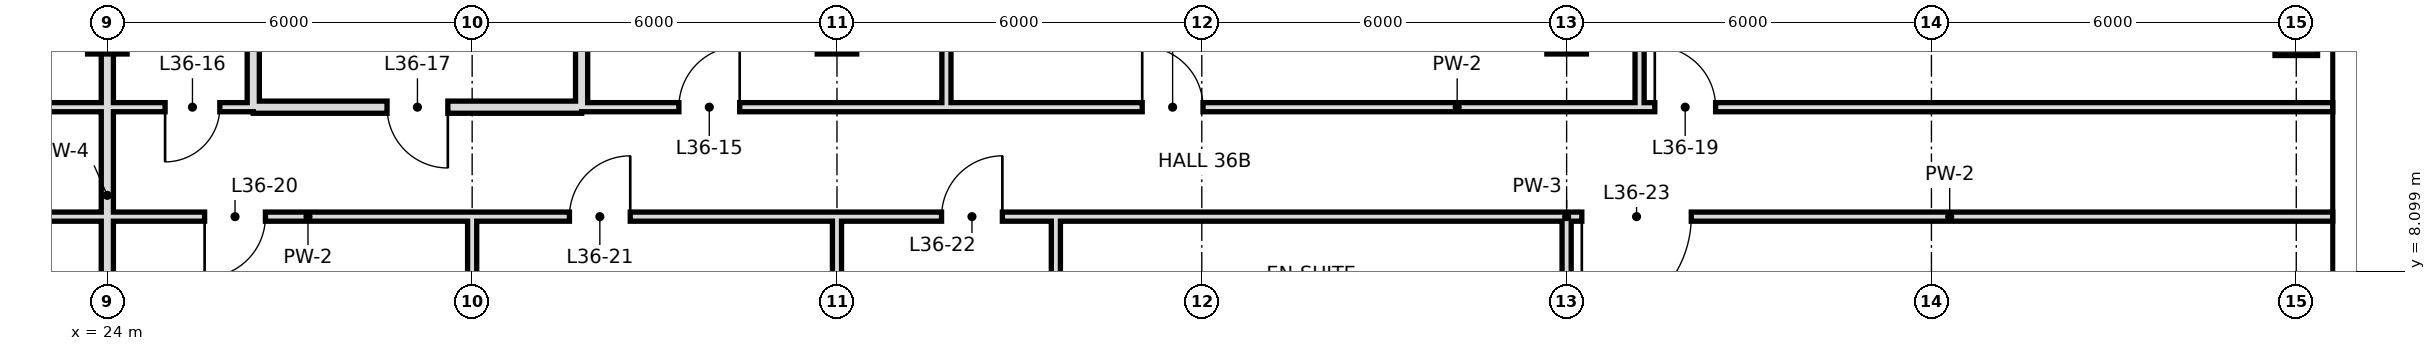
"""IFC4 building model, lengths in metres.
Left out: names, types, materials, properties, quantities, classifications, styles, units other than length and angle.
Written with IfcOpenShell. Run it as: python <this file> out.ifc"""

import sys

from ifc_helpers import new_model, si_unit, direction, frame, frame_2d, origin, origin_2d, place, context, subcontext, project, spatial, rectangle, hollow_rectangle, extrude, element, fill, save


model = new_model("IFC4")
c1 = context("Model", 3, precision=1e-05, world=origin(), true_north=direction((0.0, 1.0)))
c2 = subcontext(c1, "Body", "Model", "MODEL_VIEW")
j1 = project(units=[si_unit("LENGTHUNIT", "METRE"), si_unit("PLANEANGLEUNIT", "RADIAN")], contexts=[c1])
p1 = place(None, origin())
s1 = spatial("IfcSite", under=j1, at=p1, CompositionType="ELEMENT")
p2 = place(p1, origin())
s2 = spatial("IfcBuilding", under=s1, at=p2, CompositionType="ELEMENT")
p3 = place(p2, frame((0.0, 0.0, 158.2)))
s3 = spatial("IfcBuildingStorey", under=s2, at=p3, CompositionType="ELEMENT", Elevation=158.2)
for number, where, z_axis, x_axis in (
    (1, (24.0, 12.0, 0.0), (0.0, 0.0, 1.0), (1.0, 0.0, 0.0)),
    (2, (36.0, 12.0, 0.0), (0.0, 0.0, 1.0), (1.0, 0.0, 0.0)),
    (3, (48.0, 12.0, 0.0), (0.0, 0.0, 1.0), (1.0, 0.0, 0.0)),
):
    element("IfcColumn", number, at=place(p3, frame(where, z_axis=z_axis, x_axis=x_axis)), inside=s3, PredefinedType="COLUMN", context=c2, shape_type="SweptSolid", body=[
        extrude(hollow_rectangle(XDim=0.65, YDim=0.65, WallThickness=0.032, at=origin_2d()), origin(), (0.0, 0.0, 1.0), 3.6),
    ])
p4 = place(p3, frame((60.0, 12.0, 0.0), z_axis=(0.0, 0.0, 1.0), x_axis=(1.0, 0.0, 0.0)))
e4 = element("IfcColumn", 4, at=p4, inside=s3, PredefinedType="COLUMN", context=c2, shape_type="SweptSolid", body=[
    extrude(hollow_rectangle(XDim=0.7, YDim=0.7, WallThickness=0.036, at=origin_2d()), origin(), (0.0, 0.0, 1.0), 3.6),
])
p5 = place(p3, frame((24.0, 0.0, 0.0), z_axis=(0.0, 0.0, 1.0), x_axis=(0.0, 1.0, 0.0)))
e5 = element("IfcWall", 5, at=p5, inside=s3, PredefinedType="SOLIDWALL", context=c2, shape_type="SweptSolid", body=[
    extrude(rectangle(XDim=18.7, YDim=0.2, at=frame_2d((9.35, 0.0))), origin(), (0.0, 0.0, 1.0), 2.68),
])
p6 = place(p3, frame((26.4, 10.8, 0.0), z_axis=(0.0, 0.0, 1.0), x_axis=(0.0, 1.0, 0.0)))
e6 = element("IfcWall", 6, at=p6, inside=s3, PredefinedType="SOLIDWALL", context=c2, shape_type="SweptSolid", body=[
    extrude(rectangle(XDim=7.9, YDim=0.2, at=frame_2d((3.95, 0.0))), origin(), (0.0, 0.0, 1.0), 2.68),
])
p7 = place(p3, frame((30.0, -0.6, 0.0), z_axis=(0.0, 0.0, 1.0), x_axis=(0.0, 1.0, 0.0)))
e7 = element("IfcWall", 7, at=p7, inside=s3, PredefinedType="PARTITIONING", context=c2, shape_type="SweptSolid", body=[
    extrude(rectangle(XDim=9.6, YDim=0.15, at=frame_2d((4.8, 0.0))), origin(), (0.0, 0.0, 1.0), 2.68),
])
p8 = place(p3, frame((31.8, 10.8, 0.0), z_axis=(0.0, 0.0, 1.0), x_axis=(0.0, 1.0, 0.0)))
e8 = element("IfcWall", 8, at=p8, inside=s3, PredefinedType="SOLIDWALL", context=c2, shape_type="SweptSolid", body=[
    extrude(rectangle(XDim=7.9, YDim=0.2, at=frame_2d((3.95, 0.0))), origin(), (0.0, 0.0, 1.0), 3.38),
])
p9 = place(p3, frame((36.0, 0.0, 0.0), z_axis=(0.0, 0.0, 1.0), x_axis=(0.0, 1.0, 0.0)))
e9 = element("IfcWall", 9, at=p9, inside=s3, PredefinedType="PARTITIONING", context=c2, shape_type="SweptSolid", body=[
    extrude(rectangle(XDim=9.0, YDim=0.15, at=frame_2d((4.5, 0.0))), origin(), (0.0, 0.0, 1.0), 2.68),
])
p10 = place(p3, frame((37.8, 10.8, 0.0), z_axis=(0.0, 0.0, 1.0), x_axis=(0.0, 1.0, 0.0)))
e10 = element("IfcWall", 10, at=p10, inside=s3, PredefinedType="PARTITIONING", context=c2, shape_type="SweptSolid", body=[
    extrude(rectangle(XDim=7.9, YDim=0.15, at=frame_2d((3.95, 0.0))), origin(), (0.0, 0.0, 1.0), 3.38),
])
p11 = place(p3, frame((39.6, 6.0, 0.0), z_axis=(0.0, 0.0, 1.0), x_axis=(0.0, 1.0, 0.0)))
e11 = element("IfcWall", 11, at=p11, inside=s3, PredefinedType="PARTITIONING", context=c2, shape_type="SweptSolid", body=[
    extrude(rectangle(XDim=3.0, YDim=0.15, at=frame_2d((1.5, 0.0))), origin(), (0.0, 0.0, 1.0), 3.38),
])
p12 = place(p3, frame((48.0, 6.0, 0.0), z_axis=(0.0, 0.0, 1.0), x_axis=(0.0, 1.0, 0.0)))
e12 = element("IfcWall", 12, at=p12, inside=s3, PredefinedType="PARTITIONING", context=c2, shape_type="SweptSolid", body=[
    extrude(rectangle(XDim=3.0, YDim=0.15, at=frame_2d((1.5, 0.0))), origin(), (0.0, 0.0, 1.0), 2.68),
])
p13 = place(p3, frame((49.2, 10.8, 0.0), z_axis=(0.0, 0.0, 1.0), x_axis=(0.0, 1.0, 0.0)))
e13 = element("IfcWall", 13, at=p13, inside=s3, PredefinedType="PARTITIONING", context=c2, shape_type="SweptSolid", body=[
    extrude(rectangle(XDim=16.2, YDim=0.15, at=frame_2d((8.1, 0.0))), origin(), (0.0, 0.0, 1.0), 3.38),
])
p14 = place(p13, frame((11.2, 0.0, 0.0)))
e14 = element("IfcOpeningElement", 14, at=p14, cuts=e13, PredefinedType="OPENING", context=c2, shape_type="SweptSolid", body=[
    extrude(rectangle(XDim=1.0, YDim=2.4, at=frame_2d((0.5, 1.2))), frame((0.0, 0.085, 0.0), z_axis=(0.0, -1.0, 0.0), x_axis=(1.0, 0.0, 0.0)), (0.0, 0.0, 1.0), 0.17),
])
p15 = place(p3, frame((26.4, 10.8, 0.0), z_axis=(0.0, 0.0, 1.0), x_axis=(1.0, 0.0, 0.0)))
e15 = element("IfcWall", 15, at=p15, inside=s3, PredefinedType="SOLIDWALL", context=c2, shape_type="SweptSolid", body=[
    extrude(rectangle(XDim=5.4, YDim=0.2, at=frame_2d((2.7, 0.0))), origin(), (0.0, 0.0, 1.0), 2.68),
])
p16 = place(p15, frame((2.2, 0.0, 0.0)))
e16 = element("IfcOpeningElement", 16, at=p16, cuts=e15, PredefinedType="OPENING", context=c2, shape_type="SweptSolid", body=[
    extrude(rectangle(XDim=1.0, YDim=2.4, at=frame_2d((0.5, 1.2))), frame((0.0, 0.11, 0.0), z_axis=(0.0, -1.0, 0.0), x_axis=(1.0, 0.0, 0.0)), (0.0, 0.0, 1.0), 0.22),
])
p17 = place(p3, frame((19.2, 10.8, 0.0), z_axis=(0.0, 0.0, 1.0), x_axis=(1.0, 0.0, 0.0)))
e17 = element("IfcWall", 17, at=p17, inside=s3, PredefinedType="PARTITIONING", context=c2, shape_type="SweptSolid", body=[
    extrude(rectangle(XDim=4.8, YDim=0.15, at=frame_2d((2.4, 0.0))), origin(), (0.0, 0.0, 1.0), 3.38),
])
p18 = place(p17, frame((1.9, 0.0, 0.0)))
e18 = element("IfcOpeningElement", 18, at=p18, cuts=e17, PredefinedType="OPENING", context=c2, shape_type="SweptSolid", body=[
    extrude(rectangle(XDim=1.0, YDim=2.4, at=frame_2d((0.5, 1.2))), frame((0.0, 0.085, 0.0), z_axis=(0.0, -1.0, 0.0), x_axis=(1.0, 0.0, 0.0)), (0.0, 0.0, 1.0), 0.17),
])
p19 = place(p3, frame((31.8, 10.8, 0.0), z_axis=(0.0, 0.0, 1.0), x_axis=(1.0, 0.0, 0.0)))
e19 = element("IfcWall", 19, at=p19, inside=s3, PredefinedType="PARTITIONING", context=c2, shape_type="SweptSolid", body=[
    extrude(rectangle(XDim=28.8, YDim=0.15, at=frame_2d((14.4, 0.0))), origin(), (0.0, 0.0, 1.0), 3.38),
])
p20 = place(p19, frame((1.6, 0.0, 0.0)))
e20 = element("IfcOpeningElement", 20, at=p20, cuts=e19, PredefinedType="OPENING", context=c2, shape_type="SweptSolid", body=[
    extrude(rectangle(XDim=1.0, YDim=2.4, at=frame_2d((0.5, 1.2))), frame((0.0, 0.085, 0.0), z_axis=(0.0, -1.0, 0.0), x_axis=(1.0, 0.0, 0.0)), (0.0, 0.0, 1.0), 0.17),
])
p21 = place(p19, frame((9.22, 0.0, 0.0)))
e21 = element("IfcOpeningElement", 21, at=p21, cuts=e19, PredefinedType="OPENING", context=c2, shape_type="SweptSolid", body=[
    extrude(rectangle(XDim=1.0, YDim=2.4, at=frame_2d((0.5, 1.2))), frame((0.0, 0.085, 0.0), z_axis=(0.0, -1.0, 0.0), x_axis=(1.0, 0.0, 0.0)), (0.0, 0.0, 1.0), 0.17),
])
p22 = place(p19, frame((17.65, 0.0, 0.0)))
e22 = element("IfcOpeningElement", 22, at=p22, cuts=e19, PredefinedType="OPENING", context=c2, shape_type="SweptSolid", body=[
    extrude(rectangle(XDim=1.0, YDim=2.4, at=frame_2d((0.5, 1.2))), frame((0.0, 0.085, 0.0), z_axis=(0.0, -1.0, 0.0), x_axis=(1.0, 0.0, 0.0)), (0.0, 0.0, 1.0), 0.17),
])
p23 = place(p3, frame((24.0, 10.8, 0.0), z_axis=(0.0, 0.0, 1.0), x_axis=(1.0, 0.0, 0.0)))
e23 = element("IfcWall", 23, at=p23, inside=s3, PredefinedType="PARTITIONING", context=c2, shape_type="SweptSolid", body=[
    extrude(rectangle(XDim=2.4, YDim=0.15, at=frame_2d((1.2, 0.0))), origin(), (0.0, 0.0, 1.0), 3.38),
])
p24 = place(p23, frame((0.95, 0.0, 0.0)))
e24 = element("IfcOpeningElement", 24, at=p24, cuts=e23, PredefinedType="OPENING", context=c2, shape_type="SweptSolid", body=[
    extrude(rectangle(XDim=0.9, YDim=2.4, at=frame_2d((0.45, 1.2))), frame((0.0, 0.085, 0.0), z_axis=(0.0, -1.0, 0.0), x_axis=(1.0, 0.0, 0.0)), (0.0, 0.0, 1.0), 0.17),
])
p25 = place(p3, frame((15.0, 9.0, 0.0), z_axis=(0.0, 0.0, 1.0), x_axis=(1.0, 0.0, 0.0)))
e25 = element("IfcWall", 25, at=p25, inside=s3, PredefinedType="PARTITIONING", context=c2, shape_type="SweptSolid", body=[
    extrude(rectangle(XDim=24.6, YDim=0.15, at=frame_2d((12.3, 0.0))), origin(), (0.0, 0.0, 1.0), 3.38),
])
p26 = place(p25, frame((1.3, 0.0, 0.0)))
e26 = element("IfcOpeningElement", 26, at=p26, cuts=e25, PredefinedType="OPENING", context=c2, shape_type="SweptSolid", body=[
    extrude(rectangle(XDim=1.0, YDim=2.4, at=frame_2d((0.5, 1.2))), frame((0.0, 0.085, 0.0), z_axis=(0.0, -1.0, 0.0), x_axis=(1.0, 0.0, 0.0)), (0.0, 0.0, 1.0), 0.17),
])
p27 = place(p25, frame((5.84, 0.0, 0.0)))
e27 = element("IfcOpeningElement", 27, at=p27, cuts=e25, PredefinedType="OPENING", context=c2, shape_type="SweptSolid", body=[
    extrude(rectangle(XDim=1.8, YDim=2.4, at=frame_2d((0.9, 1.2))), frame((0.0, 0.085, 0.0), z_axis=(0.0, -1.0, 0.0), x_axis=(1.0, 0.0, 0.0)), (0.0, 0.0, 1.0), 0.17),
])
p28 = place(p25, frame((10.6, 0.0, 0.0)))
e28 = element("IfcOpeningElement", 28, at=p28, cuts=e25, PredefinedType="OPENING", context=c2, shape_type="SweptSolid", body=[
    extrude(rectangle(XDim=1.0, YDim=2.4, at=frame_2d((0.5, 1.2))), frame((0.0, 0.085, 0.0), z_axis=(0.0, -1.0, 0.0), x_axis=(1.0, 0.0, 0.0)), (0.0, 0.0, 1.0), 0.17),
])
p29 = place(p25, frame((16.6, 0.0, 0.0)))
e29 = element("IfcOpeningElement", 29, at=p29, cuts=e25, PredefinedType="OPENING", context=c2, shape_type="SweptSolid", body=[
    extrude(rectangle(XDim=1.0, YDim=2.4, at=frame_2d((0.5, 1.2))), frame((0.0, 0.085, 0.0), z_axis=(0.0, -1.0, 0.0), x_axis=(1.0, 0.0, 0.0)), (0.0, 0.0, 1.0), 0.17),
])
p30 = place(p25, frame((22.72, 0.0, 0.0)))
e30 = element("IfcOpeningElement", 30, at=p30, cuts=e25, PredefinedType="OPENING", context=c2, shape_type="SweptSolid", body=[
    extrude(rectangle(XDim=1.0, YDim=2.4, at=frame_2d((0.5, 1.2))), frame((0.0, 0.085, 0.0), z_axis=(0.0, -1.0, 0.0), x_axis=(1.0, 0.0, 0.0)), (0.0, 0.0, 1.0), 0.17),
])
p31 = place(p3, frame((48.0, 9.0, 0.0), z_axis=(0.0, 0.0, 1.0), x_axis=(1.0, 0.0, 0.0)))
e31 = element("IfcWall", 31, at=p31, inside=s3, PredefinedType="PARTITIONING", context=c2, shape_type="SweptSolid", body=[
    extrude(rectangle(XDim=12.6, YDim=0.15, at=frame_2d((6.3, 0.0))), origin(), (0.0, 0.0, 1.0), 3.38),
])
p32 = place(p31, frame((0.25, 0.0, 0.0)))
e32 = element("IfcOpeningElement", 32, at=p32, cuts=e31, PredefinedType="OPENING", context=c2, shape_type="SweptSolid", body=[
    extrude(rectangle(XDim=1.8, YDim=2.4, at=frame_2d((0.9, 1.2))), frame((0.0, 0.085, 0.0), z_axis=(0.0, -1.0, 0.0), x_axis=(1.0, 0.0, 0.0)), (0.0, 0.0, 1.0), 0.17),
])
p33 = place(p3, frame((39.6, 9.0, 0.0), z_axis=(0.0, 0.0, 1.0), x_axis=(1.0, 0.0, 0.0)))
e33 = element("IfcWall", 33, at=p33, inside=s3, PredefinedType="PARTITIONING", context=c2, shape_type="SweptSolid", body=[
    extrude(rectangle(XDim=8.4, YDim=0.15, at=frame_2d((4.2, 0.0))), origin(), (0.0, 0.0, 1.0), 3.38),
])
p34 = place(p20, frame((1.0, 0.0, 0.0), z_axis=(0.0, 0.0, 1.0), x_axis=(-1.0, 0.0, 0.0)))
e34 = element("IfcDoor", 34, at=p34, inside=s3, OperationType="SINGLE_SWING_LEFT", PredefinedType="DOOR", context=c2, shape_type="SweptSolid", body=[
    extrude(rectangle(XDim=1.0, YDim=2.4, at=frame_2d((0.5, 1.2))), frame((0.0, 0.025, 0.0), z_axis=(0.0, -1.0, 0.0), x_axis=(1.0, 0.0, 0.0)), (0.0, 0.0, 1.0), 0.05),
])
fill(e20, e34)
p35 = place(p24, frame((0.9, 0.0, 0.0), z_axis=(0.0, 0.0, 1.0), x_axis=(-1.0, 0.0, 0.0)))
e35 = element("IfcDoor", 35, at=p35, inside=s3, OperationType="SINGLE_SWING_RIGHT", PredefinedType="DOOR", context=c2, shape_type="SweptSolid", body=[
    extrude(rectangle(XDim=0.9, YDim=2.4, at=frame_2d((0.45, 1.2))), frame((0.0, 0.025, 0.0), z_axis=(0.0, -1.0, 0.0), x_axis=(1.0, 0.0, 0.0)), (0.0, 0.0, 1.0), 0.05),
])
fill(e24, e35)
p36 = place(p16, origin())
e36 = element("IfcDoor", 36, at=p36, inside=s3, OperationType="SINGLE_SWING_RIGHT", PredefinedType="DOOR", context=c2, shape_type="SweptSolid", body=[
    extrude(rectangle(XDim=1.0, YDim=2.4, at=frame_2d((0.5, 1.2))), frame((0.0, 0.025, 0.0), z_axis=(0.0, -1.0, 0.0), x_axis=(1.0, 0.0, 0.0)), (0.0, 0.0, 1.0), 0.05),
])
fill(e16, e36)
p37 = place(p21, origin())
e37 = element("IfcDoor", 37, at=p37, inside=s3, OperationType="SINGLE_SWING_LEFT", PredefinedType="DOOR", context=c2, shape_type="SweptSolid", body=[
    extrude(rectangle(XDim=1.0, YDim=2.4, at=frame_2d((0.5, 1.2))), frame((0.0, 0.025, 0.0), z_axis=(0.0, -1.0, 0.0), x_axis=(1.0, 0.0, 0.0)), (0.0, 0.0, 1.0), 0.05),
])
fill(e21, e37)
p38 = place(p22, origin())
e38 = element("IfcDoor", 38, at=p38, inside=s3, OperationType="SINGLE_SWING_LEFT", PredefinedType="DOOR", context=c2, shape_type="SweptSolid", body=[
    extrude(rectangle(XDim=1.0, YDim=2.4, at=frame_2d((0.5, 1.2))), frame((0.0, 0.025, 0.0), z_axis=(0.0, -1.0, 0.0), x_axis=(1.0, 0.0, 0.0)), (0.0, 0.0, 1.0), 0.05),
])
fill(e22, e38)
p39 = place(p28, frame((1.0, 0.0, 0.0), z_axis=(0.0, 0.0, 1.0), x_axis=(-1.0, 0.0, 0.0)))
e39 = element("IfcDoor", 39, at=p39, inside=s3, OperationType="SINGLE_SWING_RIGHT", PredefinedType="DOOR", context=c2, shape_type="SweptSolid", body=[
    extrude(rectangle(XDim=1.0, YDim=2.4, at=frame_2d((0.5, 1.2))), frame((0.0, 0.025, 0.0), z_axis=(0.0, -1.0, 0.0), x_axis=(1.0, 0.0, 0.0)), (0.0, 0.0, 1.0), 0.05),
])
fill(e28, e39)
p40 = place(p29, frame((1.0, 0.0, 0.0), z_axis=(0.0, 0.0, 1.0), x_axis=(-1.0, 0.0, 0.0)))
e40 = element("IfcDoor", 40, at=p40, inside=s3, OperationType="SINGLE_SWING_LEFT", PredefinedType="DOOR", context=c2, shape_type="SweptSolid", body=[
    extrude(rectangle(XDim=1.0, YDim=2.4, at=frame_2d((0.5, 1.2))), frame((0.0, 0.025, 0.0), z_axis=(0.0, -1.0, 0.0), x_axis=(1.0, 0.0, 0.0)), (0.0, 0.0, 1.0), 0.05),
])
fill(e29, e40)
p41 = place(p30, frame((1.0, 0.0, 0.0), z_axis=(0.0, 0.0, 1.0), x_axis=(-1.0, 0.0, 0.0)))
e41 = element("IfcDoor", 41, at=p41, inside=s3, OperationType="SINGLE_SWING_LEFT", PredefinedType="DOOR", context=c2, shape_type="SweptSolid", body=[
    extrude(rectangle(XDim=1.0, YDim=2.4, at=frame_2d((0.5, 1.2))), frame((0.0, 0.025, 0.0), z_axis=(0.0, -1.0, 0.0), x_axis=(1.0, 0.0, 0.0)), (0.0, 0.0, 1.0), 0.05),
])
fill(e30, e41)
p42 = place(p32, frame((1.8, 0.0, 0.0), z_axis=(0.0, 0.0, 1.0), x_axis=(-1.0, 0.0, 0.0)))
e42 = element("IfcDoor", 42, at=p42, inside=s3, OperationType="SINGLE_SWING_RIGHT", PredefinedType="DOOR", context=c2, shape_type="SweptSolid", body=[
    extrude(rectangle(XDim=1.8, YDim=2.4, at=frame_2d((0.9, 1.2))), frame((0.0, 0.025, 0.0), z_axis=(0.0, -1.0, 0.0), x_axis=(1.0, 0.0, 0.0)), (0.0, 0.0, 1.0), 0.05),
])
fill(e32, e42)
save(model, sys.argv[1])
